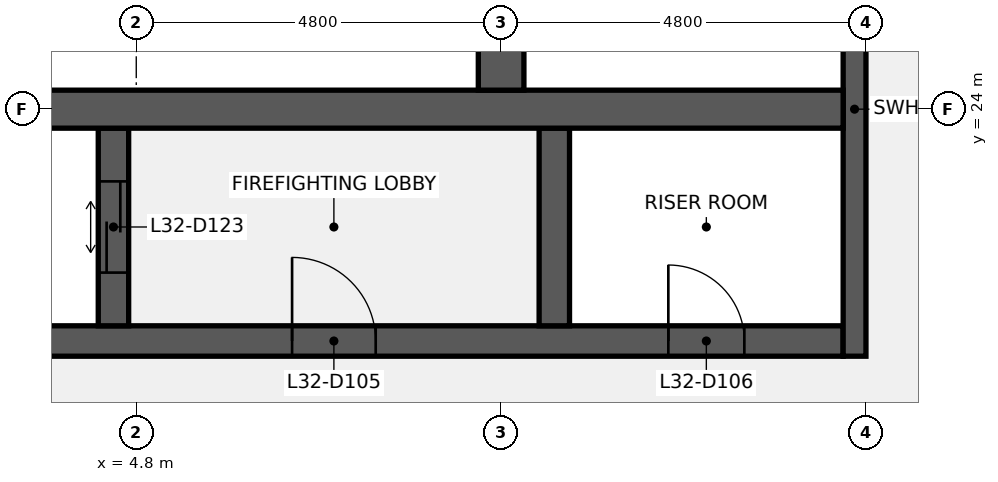
"""IFC4 building model, lengths in metres.
Left out: names, types, materials, properties, quantities, classifications, styles, units other than length and angle.
Written with IfcOpenShell. Run it as: python <this file> out.ifc"""

import sys

from ifc_helpers import new_model, si_unit, direction, frame, frame_2d, origin, place, context, subcontext, project, spatial, rectangle, extrude, element, fill, save


model = new_model("IFC4")
c1 = context("Model", 3, precision=1e-05, world=origin(), true_north=direction((0.0, 1.0)))
c2 = subcontext(c1, "Body", "Model", "MODEL_VIEW")
j1 = project(units=[si_unit("LENGTHUNIT", "METRE"), si_unit("PLANEANGLEUNIT", "RADIAN")], contexts=[c1])
p1 = place(None, origin())
s1 = spatial("IfcSite", under=j1, at=p1, CompositionType="ELEMENT")
p2 = place(p1, origin())
s2 = spatial("IfcBuilding", under=s1, at=p2, CompositionType="ELEMENT")
p3 = place(p2, frame((0.0, 0.0, 148.1)))
s3 = spatial("IfcBuildingStorey", under=s2, at=p3, CompositionType="ELEMENT", Elevation=148.1)
p4 = place(p3, frame((1.0, 20.95, 0.0), z_axis=(0.0, 0.0, 1.0), x_axis=(1.0, 0.0, 0.0)))
e1 = element("IfcWall", 1, at=p4, inside=s3, PredefinedType="SHEAR", context=c2, shape_type="SweptSolid", body=[
    extrude(rectangle(XDim=13.1, YDim=0.4, at=frame_2d((6.55, 0.0))), origin(), (0.0, 0.0, 1.0), 3.84),
])
p5 = place(p4, frame((5.85, 0.0, 0.0)))
e2 = element("IfcOpeningElement", 2, at=p5, cuts=e1, PredefinedType="OPENING", context=c2, shape_type="SweptSolid", body=[
    extrude(rectangle(XDim=1.1, YDim=2.1, at=frame_2d((0.55, 1.05))), frame((0.0, 0.21, 0.0), z_axis=(0.0, -1.0, 0.0), x_axis=(1.0, 0.0, 0.0)), (0.0, 0.0, 1.0), 0.42),
])
p6 = place(p4, frame((10.8, 0.0, 0.0)))
e3 = element("IfcOpeningElement", 3, at=p6, cuts=e1, PredefinedType="OPENING", context=c2, shape_type="SweptSolid", body=[
    extrude(rectangle(XDim=1.0, YDim=2.1, at=frame_2d((0.5, 1.05))), frame((0.0, 0.21, 0.0), z_axis=(0.0, -1.0, 0.0), x_axis=(1.0, 0.0, 0.0)), (0.0, 0.0, 1.0), 0.42),
])
p7 = place(p3, frame((14.25, 20.75, 0.0), z_axis=(0.0, 0.0, 1.0), x_axis=(0.0, 1.0, 0.0)))
e4 = element("IfcWall", 4, at=p7, inside=s3, PredefinedType="SHEAR", context=c2, shape_type="SweptSolid", body=[
    extrude(rectangle(XDim=6.5, YDim=0.3, at=frame_2d((3.25, 0.0))), origin(), (0.0, 0.0, 1.0), 3.84),
])
p8 = place(p3, frame((4.5, 21.15, 0.0), z_axis=(0.0, 0.0, 1.0), x_axis=(0.0, 1.0, 0.0)))
e5 = element("IfcWall", 5, at=p8, inside=s3, PredefinedType="SHEAR", context=c2, shape_type="SweptSolid", body=[
    extrude(rectangle(XDim=2.6, YDim=0.4, at=frame_2d((1.3, 0.0))), origin(), (0.0, 0.0, 1.0), 3.84),
])
p9 = place(p8, frame((0.7, 0.0, 0.0)))
e6 = element("IfcOpeningElement", 6, at=p9, cuts=e5, PredefinedType="OPENING", context=c2, shape_type="SweptSolid", body=[
    extrude(rectangle(XDim=1.2, YDim=2.1, at=frame_2d((0.6, 1.05))), frame((0.0, 0.21, 0.0), z_axis=(0.0, -1.0, 0.0), x_axis=(1.0, 0.0, 0.0)), (0.0, 0.0, 1.0), 0.42),
])
p10 = place(p3, frame((10.3, 21.15, 0.0), z_axis=(0.0, 0.0, 1.0), x_axis=(0.0, 1.0, 0.0)))
e7 = element("IfcWall", 7, at=p10, inside=s3, PredefinedType="SHEAR", context=c2, shape_type="SweptSolid", body=[
    extrude(rectangle(XDim=2.6, YDim=0.4, at=frame_2d((1.3, 0.0))), origin(), (0.0, 0.0, 1.0), 3.84),
])
p11 = place(p3, frame((1.0, 24.0, 0.0), z_axis=(0.0, 0.0, 1.0), x_axis=(1.0, 0.0, 0.0)))
e8 = element("IfcWall", 8, at=p11, inside=s3, PredefinedType="SHEAR", context=c2, shape_type="SweptSolid", body=[
    extrude(rectangle(XDim=13.1, YDim=0.5, at=frame_2d((6.55, 0.0))), origin(), (0.0, 0.0, 1.0), 3.84),
])
p12 = place(p3, frame((9.6, 24.25, 0.0), z_axis=(0.0, 0.0, 1.0), x_axis=(0.0, 1.0, 0.0)))
e9 = element("IfcWall", 9, at=p12, inside=s3, PredefinedType="SHEAR", context=c2, shape_type="SweptSolid", body=[
    extrude(rectangle(XDim=2.6, YDim=0.6, at=frame_2d((1.3, 0.0))), origin(), (0.0, 0.0, 1.0), 3.84),
])
p13 = place(p5, origin())
e10 = element("IfcDoor", 10, at=p13, inside=s3, OperationType="SINGLE_SWING_LEFT", PredefinedType="DOOR", context=c2, shape_type="SweptSolid", body=[
    extrude(rectangle(XDim=1.1, YDim=2.1, at=frame_2d((0.55, 1.05))), frame((0.0, 0.025, 0.0), z_axis=(0.0, -1.0, 0.0), x_axis=(1.0, 0.0, 0.0)), (0.0, 0.0, 1.0), 0.05),
])
fill(e2, e10)
p14 = place(p6, origin())
e11 = element("IfcDoor", 11, at=p14, inside=s3, OperationType="SINGLE_SWING_LEFT", PredefinedType="DOOR", context=c2, shape_type="SweptSolid", body=[
    extrude(rectangle(XDim=1.0, YDim=2.1, at=frame_2d((0.5, 1.05))), frame((0.0, 0.025, 0.0), z_axis=(0.0, -1.0, 0.0), x_axis=(1.0, 0.0, 0.0)), (0.0, 0.0, 1.0), 0.05),
])
fill(e3, e11)
p15 = place(p9, origin())
e12 = element("IfcDoor", 12, at=p15, inside=s3, OperationType="DOUBLE_DOOR_SLIDING", PredefinedType="DOOR", context=c2, shape_type="SweptSolid", body=[
    extrude(rectangle(XDim=1.2, YDim=2.1, at=frame_2d((0.6, 1.05))), frame((0.0, 0.025, 0.0), z_axis=(0.0, -1.0, 0.0), x_axis=(1.0, 0.0, 0.0)), (0.0, 0.0, 1.0), 0.05),
])
fill(e6, e12)
save(model, sys.argv[1])
